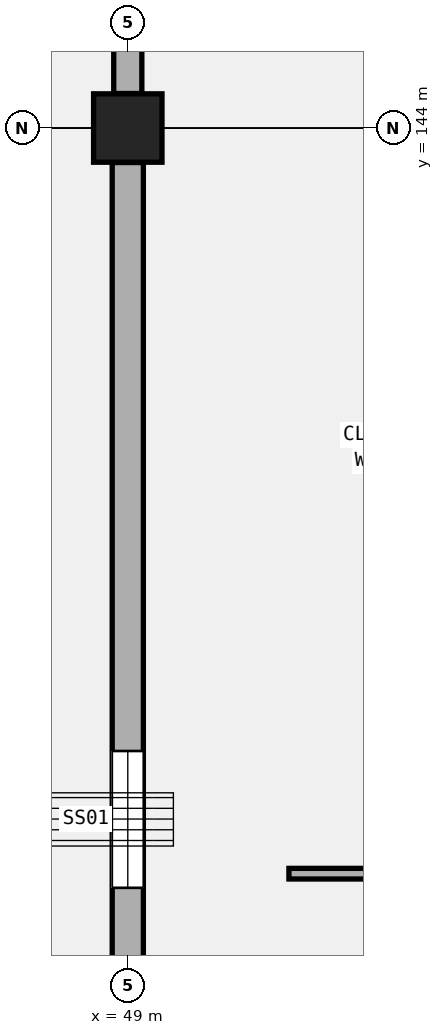
"""IFC4 building model, lengths in metres.
Left out: names, types, materials, properties, quantities, classifications, styles, units other than length and angle.
Written with IfcOpenShell. Run it as: python <this file> out.ifc"""

import sys

from ifc_helpers import new_model, si_unit, direction, frame, frame_2d, origin, origin_2d, place, context, subcontext, project, spatial, rectangle, extrude, element, fill, save


model = new_model("IFC4")
c1 = context("Model", 3, precision=1e-05, world=origin(), true_north=direction((0.0, 1.0)))
c2 = subcontext(c1, "Body", "Model", "MODEL_VIEW")
j1 = project(units=[si_unit("LENGTHUNIT", "METRE"), si_unit("PLANEANGLEUNIT", "RADIAN")], contexts=[c1])
p1 = place(None, origin())
s1 = spatial("IfcSite", under=j1, at=p1, CompositionType="ELEMENT")
p2 = place(p1, origin())
s2 = spatial("IfcBuilding", under=s1, at=p2, CompositionType="ELEMENT")
p3 = place(p2, frame((0.0, 0.0, 10.2)))
s3 = spatial("IfcBuildingStorey", under=s2, at=p3, CompositionType="ELEMENT", Elevation=10.2)
p4 = place(p3, frame((49.0, 144.0, 0.0), z_axis=(0.0, 0.0, 1.0), x_axis=(1.0, 0.0, 0.0)))
e1 = element("IfcColumn", 1, at=p4, inside=s3, PredefinedType="COLUMN", context=c2, shape_type="SweptSolid", body=[
    extrude(rectangle(XDim=0.9, YDim=0.9, at=origin_2d()), origin(), (0.0, 0.0, 1.0), 5.1),
])
p5 = place(p3, frame((49.0, 132.504, 0.0), z_axis=(0.0, 0.0, 1.0), x_axis=(0.0, 1.0, 0.0)))
e2 = element("IfcWall", 2, at=p5, inside=s3, PredefinedType="SOLIDWALL", context=c2, shape_type="SweptSolid", body=[
    extrude(rectangle(XDim=11.042, YDim=0.41, at=frame_2d((5.521, 0.0))), origin(), (0.0, 0.0, 1.0), 4.02),
])
p6 = place(p5, frame((1.5, 0.0, 0.95)))
e3 = element("IfcOpeningElement", 3, at=p6, cuts=e2, PredefinedType="OPENING", context=c2, shape_type="SweptSolid", body=[
    extrude(rectangle(XDim=1.8, YDim=1.75, at=frame_2d((0.9, 0.875))), frame((0.0, 0.215, 0.0), z_axis=(0.0, -1.0, 0.0), x_axis=(1.0, 0.0, 0.0)), (0.0, 0.0, 1.0), 0.43),
])
p7 = place(p3, frame((49.0, 144.454, 0.0), z_axis=(0.0, 0.0, 1.0), x_axis=(0.0, 1.0, 0.0)))
e4 = element("IfcWall", 4, at=p7, inside=s3, PredefinedType="SOLIDWALL", context=c2, shape_type="SweptSolid", body=[
    extrude(rectangle(XDim=0.65, YDim=0.37, at=frame_2d((0.325, 0.0))), origin(), (0.0, 0.0, 1.0), 4.12),
])
p8 = place(p3, frame((51.12, 134.19, 0.0), z_axis=(0.0, 0.0, 1.0), x_axis=(1.0, 0.0, 0.0)))
e5 = element("IfcWall", 5, at=p8, inside=s3, PredefinedType="PARTITIONING", context=c2, shape_type="SweptSolid", body=[
    extrude(rectangle(XDim=10.22, YDim=0.14, at=frame_2d((5.11, 0.0))), origin(), (0.0, 0.0, 1.0), 4.22),
])
p9 = place(p8, frame((4.62, 0.0, 0.0)))
e6 = element("IfcOpeningElement", 6, at=p9, cuts=e5, PredefinedType="OPENING", context=c2, shape_type="SweptSolid", body=[
    extrude(rectangle(XDim=0.98, YDim=2.1, at=frame_2d((0.49, 1.05))), frame((0.0, 0.08, 0.0), z_axis=(0.0, -1.0, 0.0), x_axis=(1.0, 0.0, 0.0)), (0.0, 0.0, 1.0), 0.16),
])
p10 = place(p6, origin())
e7 = element("IfcWindow", 7, at=p10, inside=s3, PartitioningType="SINGLE_PANEL", PredefinedType="WINDOW", context=c2, shape_type="SweptSolid", body=[
    extrude(rectangle(XDim=1.8, YDim=1.75, at=frame_2d((0.9, 0.875))), frame((0.0, 0.03, 0.0), z_axis=(0.0, -1.0, 0.0), x_axis=(1.0, 0.0, 0.0)), (0.0, 0.0, 1.0), 0.06),
])
fill(e3, e7)
save(model, sys.argv[1])
